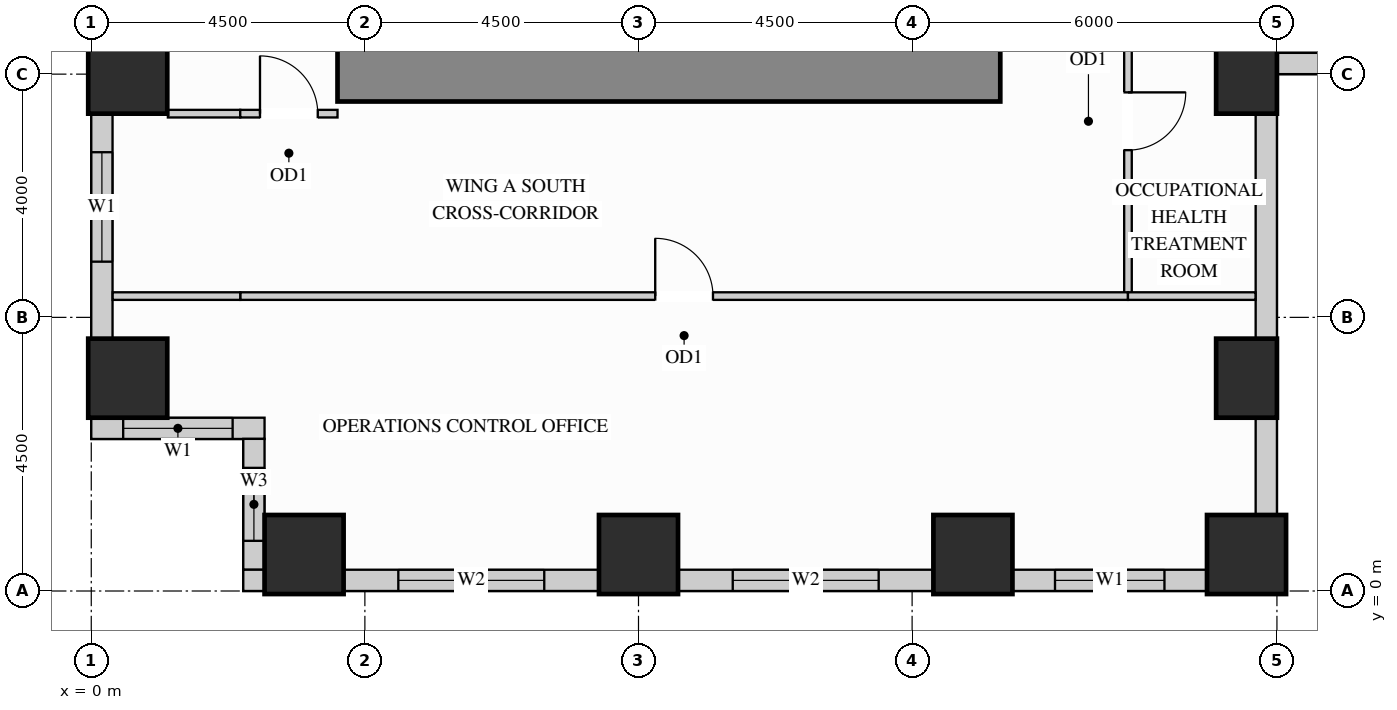
"""IFC4 building model, lengths in metres.
Left out: names, types, materials, properties, quantities, classifications, styles, units other than length and angle.
Written with IfcOpenShell. Run it as: python <this file> out.ifc"""

import sys

from ifc_helpers import new_model, si_unit, direction, frame, frame_2d, origin, origin_2d, place, context, subcontext, project, spatial, rectangle, extrude, source, transform, mapped, element, fill, save


model = new_model("IFC4")
c1 = context("Model", 3, precision=1e-05, world=origin(), true_north=direction((0.0, 1.0)))
c2 = subcontext(c1, "Body", "Model", "MODEL_VIEW")
j1 = project(units=[si_unit("LENGTHUNIT", "METRE"), si_unit("PLANEANGLEUNIT", "RADIAN")], contexts=[c1])
p1 = place(None, origin())
s1 = spatial("IfcSite", under=j1, at=p1, CompositionType="ELEMENT")
p2 = place(p1, origin())
s2 = spatial("IfcBuilding", under=s1, at=p2, CompositionType="ELEMENT")
p3 = place(p2, frame((0.0, 0.0, 33.3)))
s3 = spatial("IfcBuildingStorey", under=s2, at=p3, CompositionType="ELEMENT", Elevation=33.3)
m1 = source(origin(), c2, "Body", "SweptSolid", [
    extrude(rectangle(XDim=1.0, YDim=1.3, at=origin_2d()), origin(), (0.0, 0.0, 1.0), 3.38),
])
for number, where, z_axis, x_axis in (
    (1, (19.0, 3.5, 0.0), (0.0, 0.0, 1.0), (1.0, 0.0, 0.0)),
    (2, (19.0, 8.5, 0.0), (0.0, 0.0, 1.0), (1.0, 0.0, 0.0)),
):
    element("IfcColumn", number, at=place(p3, frame(where, z_axis=z_axis, x_axis=x_axis)), inside=s3, PredefinedType="COLUMN", context=c2, shape_type="MappedRepresentation", body=[
        mapped(m1, transform((0.0, 0.0, 0.0), x_axis=(1.0, 0.0, 0.0), y_axis=(0.0, 1.0, 0.0), z_axis=(0.0, 0.0, 1.0))),
    ])
m2 = source(origin(), c2, "Body", "SweptSolid", [
    extrude(rectangle(XDim=1.3, YDim=1.3, at=origin_2d()), origin(), (0.0, 0.0, 1.0), 3.38),
])
for number, where, z_axis, x_axis in (
    (3, (14.5, 0.6, 0.0), (0.0, 0.0, 1.0), (1.0, 0.0, 0.0)),
    (4, (19.0, 0.6, 0.0), (0.0, 0.0, 1.0), (1.0, 0.0, 0.0)),
    (5, (3.5, 0.6, 0.0), (0.0, 0.0, 1.0), (1.0, 0.0, 0.0)),
    (6, (9.0, 0.6, 0.0), (0.0, 0.0, 1.0), (1.0, 0.0, 0.0)),
    (7, (0.6, 3.5, 0.0), (0.0, 0.0, 1.0), (1.0, 0.0, 0.0)),
    (8, (0.6, 8.5, 0.0), (0.0, 0.0, 1.0), (1.0, 0.0, 0.0)),
):
    element("IfcColumn", number, at=place(p3, frame(where, z_axis=z_axis, x_axis=x_axis)), inside=s3, PredefinedType="COLUMN", context=c2, shape_type="MappedRepresentation", body=[
        mapped(m2, transform((0.0, 0.0, 0.0), x_axis=(1.0, 0.0, 0.0), y_axis=(0.0, 1.0, 0.0), z_axis=(0.0, 0.0, 1.0))),
    ])
m3 = source(origin(), c2, "Body", "SweptSolid", [
    extrude(rectangle(XDim=10.9, YDim=0.9, at=frame_2d((5.45, 0.0))), origin(), (0.0, 0.0, 1.0), 3.38),
])
p4 = place(p3, frame((4.05, 8.5, 0.0), z_axis=(0.0, 0.0, 1.0), x_axis=(1.0, 0.0, 0.0)))
e9 = element("IfcWall", 9, at=p4, inside=s3, PredefinedType="SHEAR", context=c2, shape_type="MappedRepresentation", body=[
    mapped(m3, transform((0.0, 0.0, 0.0), x_axis=(1.0, 0.0, 0.0), y_axis=(0.0, 1.0, 0.0), z_axis=(0.0, 0.0, 1.0))),
])
p5 = place(p3, frame((0.175, 7.852, 0.0), z_axis=(0.0, 0.0, 1.0), x_axis=(0.0, -1.0, 0.0)))
e10 = element("IfcWall", 10, at=p5, inside=s3, PredefinedType="SOLIDWALL", context=c2, shape_type="SweptSolid", body=[
    extrude(rectangle(XDim=3.704, YDim=0.35, at=frame_2d((1.852, 0.0))), origin(), (0.0, 0.0, 1.0), 2.51),
])
p6 = place(p5, frame((0.636, 0.0, 0.78)))
e11 = element("IfcOpeningElement", 11, at=p6, cuts=e10, PredefinedType="OPENING", context=c2, shape_type="SweptSolid", body=[
    extrude(rectangle(XDim=1.8, YDim=1.55, at=frame_2d((0.9, 0.775))), frame((0.0, 0.185, 0.0), z_axis=(0.0, -1.0, 0.0), x_axis=(1.0, 0.0, 0.0)), (0.0, 0.0, 1.0), 0.37),
])
p7 = place(p3, frame((0.0, 2.675, 0.0), z_axis=(0.0, 0.0, 1.0), x_axis=(1.0, 0.0, 0.0)))
e12 = element("IfcWall", 12, at=p7, inside=s3, PredefinedType="SOLIDWALL", context=c2, shape_type="SweptSolid", body=[
    extrude(rectangle(XDim=2.85, YDim=0.35, at=frame_2d((1.425, 0.0))), origin(), (0.0, 0.0, 1.0), 3.365),
])
p8 = place(p7, frame((0.525, 0.0, 0.78)))
e13 = element("IfcOpeningElement", 13, at=p8, cuts=e12, PredefinedType="OPENING", context=c2, shape_type="SweptSolid", body=[
    extrude(rectangle(XDim=1.8, YDim=2.1, at=frame_2d((0.9, 1.05))), frame((0.0, 0.185, 0.0), z_axis=(0.0, -1.0, 0.0), x_axis=(1.0, 0.0, 0.0)), (0.0, 0.0, 1.0), 0.37),
])
p9 = place(p3, frame((2.675, 2.502, 0.0), z_axis=(0.0, 0.0, 1.0), x_axis=(0.0, -1.0, 0.0)))
e14 = element("IfcWall", 14, at=p9, inside=s3, PredefinedType="SOLIDWALL", context=c2, shape_type="SweptSolid", body=[
    extrude(rectangle(XDim=2.154, YDim=0.35, at=frame_2d((1.077, 0.0))), origin(), (0.0, 0.0, 1.0), 3.365),
])
p10 = place(p9, frame((0.477, 0.0, 0.78)))
e15 = element("IfcOpeningElement", 15, at=p10, cuts=e14, PredefinedType="OPENING", context=c2, shape_type="SweptSolid", body=[
    extrude(rectangle(XDim=1.2, YDim=2.1, at=frame_2d((0.6, 1.05))), frame((0.0, 0.185, 0.0), z_axis=(0.0, -1.0, 0.0), x_axis=(1.0, 0.0, 0.0)), (0.0, 0.0, 1.0), 0.37),
])
m4 = source(origin(), c2, "Body", "SweptSolid", [
    extrude(rectangle(XDim=0.352, YDim=0.35, at=frame_2d((0.176, 0.0))), origin(), (0.0, 0.0, 1.0), 3.365),
])
p11 = place(p3, frame((2.5, 0.175, 0.0), z_axis=(0.0, 0.0, 1.0), x_axis=(1.0, 0.0, 0.0)))
e16 = element("IfcWall", 16, at=p11, inside=s3, PredefinedType="SOLIDWALL", context=c2, shape_type="MappedRepresentation", body=[
    mapped(m4, transform((0.0, 0.0, 0.0), x_axis=(1.0, 0.0, 0.0), y_axis=(0.0, 1.0, 0.0), z_axis=(0.0, 0.0, 1.0))),
])
p12 = place(p3, frame((4.148, 0.175, 0.0), z_axis=(0.0, 0.0, 1.0), x_axis=(1.0, 0.0, 0.0)))
e17 = element("IfcWall", 17, at=p12, inside=s3, PredefinedType="SOLIDWALL", context=c2, shape_type="SweptSolid", body=[
    extrude(rectangle(XDim=4.204, YDim=0.35, at=frame_2d((2.102, 0.0))), origin(), (0.0, 0.0, 1.0), 2.51),
])
p13 = place(p12, frame((0.902, 0.0, 0.78)))
e18 = element("IfcOpeningElement", 18, at=p13, cuts=e17, PredefinedType="OPENING", context=c2, shape_type="SweptSolid", body=[
    extrude(rectangle(XDim=2.4, YDim=1.55, at=frame_2d((1.2, 0.775))), frame((0.0, 0.185, 0.0), z_axis=(0.0, -1.0, 0.0), x_axis=(1.0, 0.0, 0.0)), (0.0, 0.0, 1.0), 0.37),
])
p14 = place(p3, frame((9.648, 0.175, 0.0), z_axis=(0.0, 0.0, 1.0), x_axis=(1.0, 0.0, 0.0)))
e19 = element("IfcWall", 19, at=p14, inside=s3, PredefinedType="SOLIDWALL", context=c2, shape_type="SweptSolid", body=[
    extrude(rectangle(XDim=4.204, YDim=0.35, at=frame_2d((2.102, 0.0))), origin(), (0.0, 0.0, 1.0), 2.51),
])
p15 = place(p14, frame((0.902, 0.0, 0.78)))
e20 = element("IfcOpeningElement", 20, at=p15, cuts=e19, PredefinedType="OPENING", context=c2, shape_type="SweptSolid", body=[
    extrude(rectangle(XDim=2.4, YDim=1.55, at=frame_2d((1.2, 0.775))), frame((0.0, 0.185, 0.0), z_axis=(0.0, -1.0, 0.0), x_axis=(1.0, 0.0, 0.0)), (0.0, 0.0, 1.0), 0.37),
])
p16 = place(p3, frame((15.148, 0.175, 0.0), z_axis=(0.0, 0.0, 1.0), x_axis=(1.0, 0.0, 0.0)))
e21 = element("IfcWall", 21, at=p16, inside=s3, PredefinedType="SOLIDWALL", context=c2, shape_type="SweptSolid", body=[
    extrude(rectangle(XDim=3.204, YDim=0.35, at=frame_2d((1.602, 0.0))), origin(), (0.0, 0.0, 1.0), 2.51),
])
p17 = place(p16, frame((0.702, 0.0, 0.78)))
e22 = element("IfcOpeningElement", 22, at=p17, cuts=e21, PredefinedType="OPENING", context=c2, shape_type="SweptSolid", body=[
    extrude(rectangle(XDim=1.8, YDim=1.55, at=frame_2d((0.9, 0.775))), frame((0.0, 0.185, 0.0), z_axis=(0.0, -1.0, 0.0), x_axis=(1.0, 0.0, 0.0)), (0.0, 0.0, 1.0), 0.37),
])
m5 = source(origin(), c2, "Body", "SweptSolid", [
    extrude(rectangle(XDim=1.604, YDim=0.35, at=frame_2d((0.802, 0.0))), origin(), (0.0, 0.0, 1.0), 2.51),
])
p18 = place(p3, frame((19.325, 1.248, 0.0), z_axis=(0.0, 0.0, 1.0), x_axis=(0.0, 1.0, 0.0)))
e23 = element("IfcWall", 23, at=p18, inside=s3, PredefinedType="SOLIDWALL", context=c2, shape_type="MappedRepresentation", body=[
    mapped(m5, transform((0.0, 0.0, 0.0), x_axis=(1.0, 0.0, 0.0), y_axis=(0.0, 1.0, 0.0), z_axis=(0.0, 0.0, 1.0))),
])
m6 = source(origin(), c2, "Body", "SweptSolid", [
    extrude(rectangle(XDim=3.704, YDim=0.35, at=frame_2d((1.852, 0.0))), origin(), (0.0, 0.0, 1.0), 2.51),
])
p19 = place(p3, frame((19.325, 4.148, 0.0), z_axis=(0.0, 0.0, 1.0), x_axis=(0.0, 1.0, 0.0)))
e24 = element("IfcWall", 24, at=p19, inside=s3, PredefinedType="SOLIDWALL", context=c2, shape_type="MappedRepresentation", body=[
    mapped(m6, transform((0.0, 0.0, 0.0), x_axis=(1.0, 0.0, 0.0), y_axis=(0.0, 1.0, 0.0), z_axis=(0.0, 0.0, 1.0))),
])
p20 = place(p3, frame((19.498, 8.675, 0.0), z_axis=(0.0, 0.0, 1.0), x_axis=(1.0, 0.0, 0.0)))
e25 = element("IfcWall", 25, at=p20, inside=s3, PredefinedType="SOLIDWALL", context=c2, shape_type="SweptSolid", body=[
    extrude(rectangle(XDim=3.404, YDim=0.35, at=frame_2d((1.702, 0.0))), origin(), (0.0, 0.0, 1.0), 3.365),
])
p21 = place(p20, frame((0.952, 0.0, 0.78)))
e26 = element("IfcOpeningElement", 26, at=p21, cuts=e25, PredefinedType="OPENING", context=c2, shape_type="SweptSolid", body=[
    extrude(rectangle(XDim=1.5, YDim=2.0, at=frame_2d((0.75, 1.0))), frame((0.0, 0.185, 0.0), z_axis=(0.0, -1.0, 0.0), x_axis=(1.0, 0.0, 0.0)), (0.0, 0.0, 1.0), 0.37),
])
p22 = place(p3, frame((17.05, 4.85, 0.0), z_axis=(0.0, 0.0, 1.0), x_axis=(0.0, 1.0, 0.0)))
e27 = element("IfcWall", 27, at=p22, inside=s3, PredefinedType="PARTITIONING", context=c2, shape_type="SweptSolid", body=[
    extrude(rectangle(XDim=5.75, YDim=0.125, at=frame_2d((2.875, 0.0))), origin(), (0.0, 0.0, 1.0), 3.365),
])
p23 = place(p22, frame((2.4, 0.0, 0.0)))
e28 = element("IfcOpeningElement", 28, at=p23, cuts=e27, PredefinedType="OPENING", context=c2, shape_type="SweptSolid", body=[
    extrude(rectangle(XDim=0.95, YDim=2.15, at=frame_2d((0.475, 1.075))), frame((0.0, 0.073, 0.0), z_axis=(0.0, -1.0, 0.0), x_axis=(1.0, 0.0, 0.0)), (0.0, 0.0, 1.0), 0.145),
])
m7 = source(origin(), c2, "Body", "SweptSolid", [
    extrude(rectangle(XDim=1.19, YDim=0.125, at=frame_2d((0.595, 0.0))), origin(), (0.0, 0.0, 1.0), 3.365),
])
p24 = place(p3, frame((1.26, 7.85, 0.0), z_axis=(0.0, 0.0, 1.0), x_axis=(1.0, 0.0, 0.0)))
e29 = element("IfcWall", 29, at=p24, inside=s3, PredefinedType="PARTITIONING", context=c2, shape_type="MappedRepresentation", body=[
    mapped(m7, transform((0.0, 0.0, 0.0), x_axis=(1.0, 0.0, 0.0), y_axis=(0.0, 1.0, 0.0), z_axis=(0.0, 0.0, 1.0))),
])
p25 = place(p3, frame((2.45, 7.85, 0.0), z_axis=(0.0, 0.0, 1.0), x_axis=(1.0, 0.0, 0.0)))
e30 = element("IfcWall", 30, at=p25, inside=s3, PredefinedType="PARTITIONING", context=c2, shape_type="SweptSolid", body=[
    extrude(rectangle(XDim=1.6, YDim=0.125, at=frame_2d((0.8, 0.0))), origin(), (0.0, 0.0, 1.0), 3.365),
])
p26 = place(p25, frame((0.325, 0.0, 0.0)))
e31 = element("IfcOpeningElement", 31, at=p26, cuts=e30, PredefinedType="OPENING", context=c2, shape_type="SweptSolid", body=[
    extrude(rectangle(XDim=0.95, YDim=2.15, at=frame_2d((0.475, 1.075))), frame((0.0, 0.073, 0.0), z_axis=(0.0, -1.0, 0.0), x_axis=(1.0, 0.0, 0.0)), (0.0, 0.0, 1.0), 0.145),
])
p27 = place(p3, frame((2.45, 4.85, 0.0), z_axis=(0.0, 0.0, 1.0), x_axis=(1.0, 0.0, 0.0)))
e32 = element("IfcWall", 32, at=p27, inside=s3, PredefinedType="PARTITIONING", context=c2, shape_type="SweptSolid", body=[
    extrude(rectangle(XDim=14.6, YDim=0.125, at=frame_2d((7.3, 0.0))), origin(), (0.0, 0.0, 1.0), 2.828),
])
p28 = place(p27, frame((6.825, 0.0, 0.0)))
e33 = element("IfcOpeningElement", 33, at=p28, cuts=e32, PredefinedType="OPENING", context=c2, shape_type="SweptSolid", body=[
    extrude(rectangle(XDim=0.95, YDim=2.15, at=frame_2d((0.475, 1.075))), frame((0.0, 0.073, 0.0), z_axis=(0.0, -1.0, 0.0), x_axis=(1.0, 0.0, 0.0)), (0.0, 0.0, 1.0), 0.145),
])
m8 = source(origin(), c2, "Body", "SweptSolid", [
    extrude(rectangle(XDim=2.098, YDim=0.125, at=frame_2d((1.049, 0.0))), origin(), (0.0, 0.0, 1.0), 2.828),
])
for number, where, z_axis, x_axis in (
    (34, (0.352, 4.85, 0.0), (0.0, 0.0, 1.0), (1.0, 0.0, 0.0)),
    (35, (17.05, 4.85, 0.0), (0.0, 0.0, 1.0), (1.0, 0.0, 0.0)),
):
    element("IfcWall", number, at=place(p3, frame(where, z_axis=z_axis, x_axis=x_axis)), inside=s3, PredefinedType="PARTITIONING", context=c2, shape_type="MappedRepresentation", body=[
        mapped(m8, transform((0.0, 0.0, 0.0), x_axis=(1.0, 0.0, 0.0), y_axis=(0.0, 1.0, 0.0), z_axis=(0.0, 0.0, 1.0))),
    ])
m9 = source(origin(), c2, "Body", "SweptSolid", [
    extrude(rectangle(XDim=0.95, YDim=2.15, at=frame_2d((0.475, 1.075))), frame((0.0, 0.025, 0.0), z_axis=(0.0, -1.0, 0.0), x_axis=(1.0, 0.0, 0.0)), (0.0, 0.0, 1.0), 0.05),
])
p29 = place(p23, origin())
e36 = element("IfcDoor", 36, at=p29, inside=s3, OperationType="SINGLE_SWING_RIGHT", PredefinedType="DOOR", context=c2, shape_type="MappedRepresentation", body=[
    mapped(m9, transform((0.0, 0.0, 0.0), x_axis=(1.0, 0.0, 0.0), y_axis=(0.0, 1.0, 0.0), z_axis=(0.0, 0.0, 1.0))),
])
fill(e28, e36)
p30 = place(p28, origin())
e37 = element("IfcDoor", 37, at=p30, inside=s3, OperationType="SINGLE_SWING_LEFT", PredefinedType="DOOR", context=c2, shape_type="MappedRepresentation", body=[
    mapped(m9, transform((0.0, 0.0, 0.0), x_axis=(1.0, 0.0, 0.0), y_axis=(0.0, 1.0, 0.0), z_axis=(0.0, 0.0, 1.0))),
])
fill(e33, e37)
p31 = place(p26, origin())
e38 = element("IfcDoor", 38, at=p31, inside=s3, OperationType="SINGLE_SWING_LEFT", PredefinedType="DOOR", context=c2, shape_type="MappedRepresentation", body=[
    mapped(m9, transform((0.0, 0.0, 0.0), x_axis=(1.0, 0.0, 0.0), y_axis=(0.0, 1.0, 0.0), z_axis=(0.0, 0.0, 1.0))),
])
fill(e31, e38)
m10 = source(origin(), c2, "Body", "SweptSolid", [
    extrude(rectangle(XDim=1.8, YDim=1.55, at=frame_2d((0.9, 0.775))), frame((0.0, 0.03, 0.0), z_axis=(0.0, -1.0, 0.0), x_axis=(1.0, 0.0, 0.0)), (0.0, 0.0, 1.0), 0.06),
])
p32 = place(p6, origin())
e39 = element("IfcWindow", 39, at=p32, inside=s3, PartitioningType="SINGLE_PANEL", PredefinedType="WINDOW", context=c2, shape_type="MappedRepresentation", body=[
    mapped(m10, transform((0.0, 0.0, 0.0), x_axis=(1.0, 0.0, 0.0), y_axis=(0.0, 1.0, 0.0), z_axis=(0.0, 0.0, 1.0))),
])
fill(e11, e39)
m11 = source(origin(), c2, "Body", "SweptSolid", [
    extrude(rectangle(XDim=1.8, YDim=2.1, at=frame_2d((0.9, 1.05))), frame((0.0, 0.03, 0.0), z_axis=(0.0, -1.0, 0.0), x_axis=(1.0, 0.0, 0.0)), (0.0, 0.0, 1.0), 0.06),
])
p33 = place(p8, origin())
e40 = element("IfcWindow", 40, at=p33, inside=s3, PartitioningType="SINGLE_PANEL", PredefinedType="WINDOW", context=c2, shape_type="MappedRepresentation", body=[
    mapped(m11, transform((0.0, 0.0, 0.0), x_axis=(1.0, 0.0, 0.0), y_axis=(0.0, 1.0, 0.0), z_axis=(0.0, 0.0, 1.0))),
])
fill(e13, e40)
p34 = place(p17, origin())
e41 = element("IfcWindow", 41, at=p34, inside=s3, PartitioningType="SINGLE_PANEL", PredefinedType="WINDOW", context=c2, shape_type="MappedRepresentation", body=[
    mapped(m10, transform((0.0, 0.0, 0.0), x_axis=(1.0, 0.0, 0.0), y_axis=(0.0, 1.0, 0.0), z_axis=(0.0, 0.0, 1.0))),
])
fill(e22, e41)
m12 = source(origin(), c2, "Body", "SweptSolid", [
    extrude(rectangle(XDim=2.4, YDim=1.55, at=frame_2d((1.2, 0.775))), frame((0.0, 0.03, 0.0), z_axis=(0.0, -1.0, 0.0), x_axis=(1.0, 0.0, 0.0)), (0.0, 0.0, 1.0), 0.06),
])
p35 = place(p13, origin())
e42 = element("IfcWindow", 42, at=p35, inside=s3, PartitioningType="SINGLE_PANEL", PredefinedType="WINDOW", context=c2, shape_type="MappedRepresentation", body=[
    mapped(m12, transform((0.0, 0.0, 0.0), x_axis=(1.0, 0.0, 0.0), y_axis=(0.0, 1.0, 0.0), z_axis=(0.0, 0.0, 1.0))),
])
fill(e18, e42)
p36 = place(p15, origin())
e43 = element("IfcWindow", 43, at=p36, inside=s3, PartitioningType="SINGLE_PANEL", PredefinedType="WINDOW", context=c2, shape_type="MappedRepresentation", body=[
    mapped(m12, transform((0.0, 0.0, 0.0), x_axis=(1.0, 0.0, 0.0), y_axis=(0.0, 1.0, 0.0), z_axis=(0.0, 0.0, 1.0))),
])
fill(e20, e43)
m13 = source(origin(), c2, "Body", "SweptSolid", [
    extrude(rectangle(XDim=1.2, YDim=2.1, at=frame_2d((0.6, 1.05))), frame((0.0, 0.03, 0.0), z_axis=(0.0, -1.0, 0.0), x_axis=(1.0, 0.0, 0.0)), (0.0, 0.0, 1.0), 0.06),
])
p37 = place(p10, origin())
e44 = element("IfcWindow", 44, at=p37, inside=s3, PartitioningType="SINGLE_PANEL", PredefinedType="WINDOW", context=c2, shape_type="MappedRepresentation", body=[
    mapped(m13, transform((0.0, 0.0, 0.0), x_axis=(1.0, 0.0, 0.0), y_axis=(0.0, 1.0, 0.0), z_axis=(0.0, 0.0, 1.0))),
])
fill(e15, e44)
save(model, sys.argv[1])
